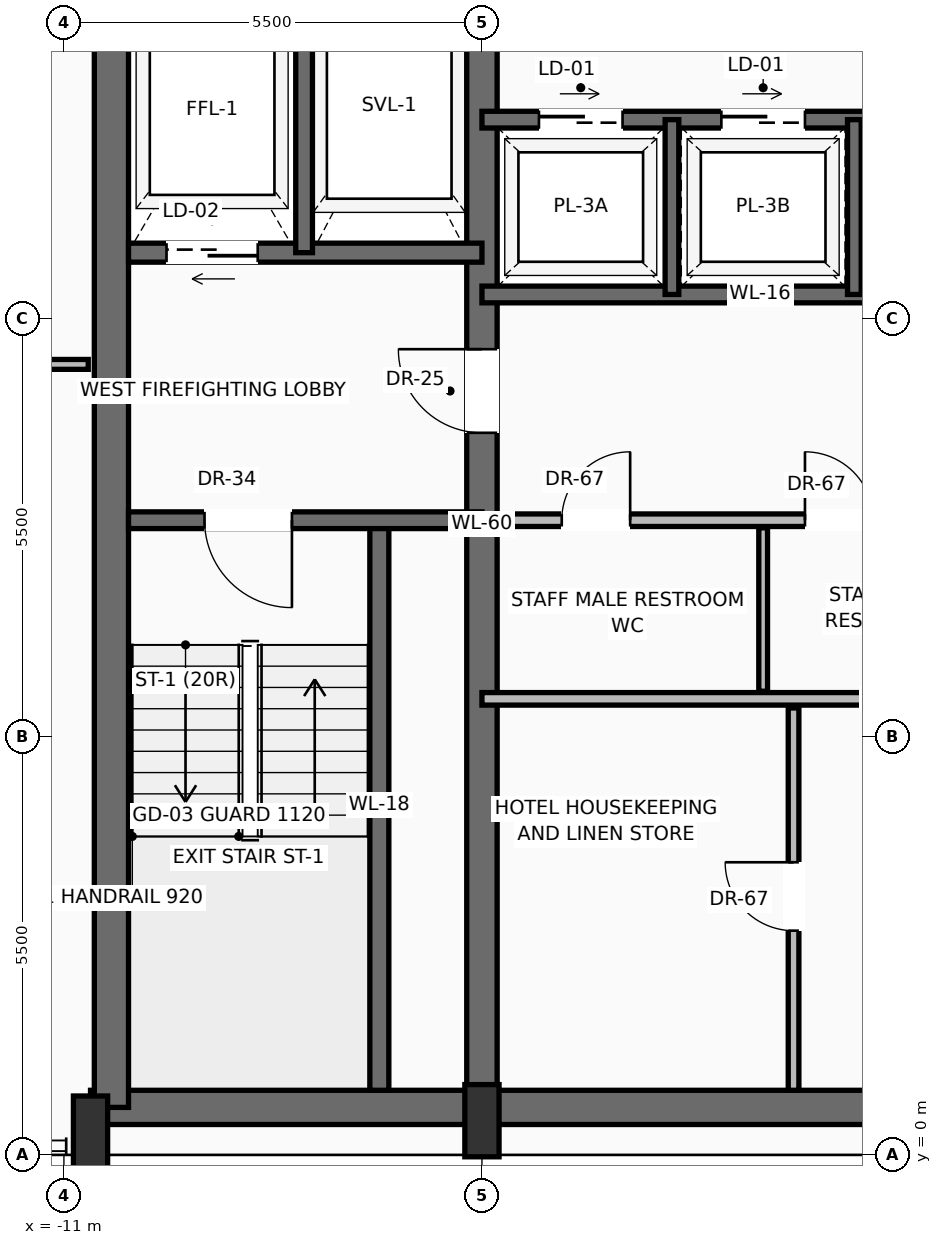
"""IFC4 building model, lengths in metres.
Left out: names, types, materials, properties, quantities, classifications, styles, units other than length and angle.
Written with IfcOpenShell. Run it as: python <this file> out.ifc"""

import sys

from ifc_helpers import new_model, si_unit, direction, frame, frame_2d, origin, origin_2d, place, context, subcontext, project, spatial, rectangle, extrude, source, transform, mapped, element, fill, save


model = new_model("IFC4")
c1 = context("Model", 3, precision=1e-05, world=origin(), true_north=direction((0.0, 1.0)))
c2 = subcontext(c1, "Body", "Model", "MODEL_VIEW")
j1 = project(units=[si_unit("LENGTHUNIT", "METRE"), si_unit("PLANEANGLEUNIT", "RADIAN")], contexts=[c1])
p1 = place(None, origin())
s1 = spatial("IfcSite", under=j1, at=p1, CompositionType="ELEMENT")
p2 = place(p1, origin())
s2 = spatial("IfcBuilding", under=s1, at=p2, CompositionType="ELEMENT")
p3 = place(p2, frame((0.0, 0.0, 269.55)))
s3 = spatial("IfcBuildingStorey", under=s2, at=p3, CompositionType="ELEMENT", Elevation=269.55)
p4 = place(p3, frame((-10.65, 0.625, 0.0), z_axis=(0.0, 0.0, 1.0), x_axis=(1.0, 0.0, 0.0)))
e1 = element("IfcWall", 1, at=p4, inside=s3, PredefinedType="SHEAR", context=c2, shape_type="SweptSolid", body=[
    extrude(rectangle(XDim=21.3, YDim=0.45, at=frame_2d((10.65, 0.0))), origin(), (0.0, 0.0, 1.0), 3.24),
])
p5 = place(p3, frame((-10.375, 0.625, 0.0), z_axis=(0.0, 0.0, 1.0), x_axis=(0.0, 1.0, 0.0)))
e2 = element("IfcWall", 2, at=p5, inside=s3, PredefinedType="SHEAR", context=c2, shape_type="SweptSolid", body=[
    extrude(rectangle(XDim=15.35, YDim=0.45, at=frame_2d((7.675, 0.0))), origin(), (0.0, 0.0, 1.0), 3.24),
])
p6 = place(p3, frame((-5.5, 0.625, 0.0), z_axis=(0.0, 0.0, 1.0), x_axis=(0.0, 1.0, 0.0)))
e3 = element("IfcWall", 3, at=p6, inside=s3, PredefinedType="SHEAR", context=c2, shape_type="SweptSolid", body=[
    extrude(rectangle(XDim=15.35, YDim=0.4, at=frame_2d((7.675, 0.0))), origin(), (0.0, 0.0, 1.0), 3.24),
])
p7 = place(p6, frame((8.875, 0.0, 0.0)))
e4 = element("IfcOpeningElement", 4, at=p7, cuts=e3, PredefinedType="OPENING", context=c2, shape_type="SweptSolid", body=[
    extrude(rectangle(XDim=1.1, YDim=2.2, at=frame_2d((0.55, 1.1))), frame((0.0, 0.21, 0.0), z_axis=(0.0, -1.0, 0.0), x_axis=(1.0, 0.0, 0.0)), (0.0, 0.0, 1.0), 0.42),
])
m1 = source(origin(), c2, "Body", "SweptSolid", [
    extrude(rectangle(XDim=0.45, YDim=0.95, at=origin_2d()), origin(), (0.0, 0.0, 1.0), 3.45),
])
for number, where, z_axis, x_axis in (
    (5, (-10.65, 0.3, 0.0), (0.0, 0.0, 1.0), (1.0, 0.0, 0.0)),
    (6, (-5.5, 0.45, 0.0), (0.0, 0.0, 1.0), (1.0, 0.0, 0.0)),
):
    element("IfcColumn", number, at=place(p3, frame(where, z_axis=z_axis, x_axis=x_axis)), inside=s3, PredefinedType="PILASTER", context=c2, shape_type="MappedRepresentation", body=[
        mapped(m1, transform((0.0, 0.0, 0.0), scale=1.0)),
    ])
p8 = place(p3, frame((-18.621, 14.387, 0.0), z_axis=(0.0, 0.0, 1.0), x_axis=(0.501208020252, 0.865326828681, 0.0)))
e7 = element("IfcWall", 7, at=p8, inside=s3, PredefinedType="SOLIDWALL", context=c2, shape_type="SweptSolid", body=[
    extrude(rectangle(XDim=20.003, YDim=0.28, at=frame_2d((10.001, 0.0))), origin(), (0.0, 0.0, 1.0), 2.82),
])
p9 = place(p8, frame((4.801, 0.0, 0.0)))
e8 = element("IfcOpeningElement", 8, at=p9, cuts=e7, PredefinedType="OPENING", context=c2, shape_type="SweptSolid", body=[
    extrude(rectangle(XDim=1.6, YDim=2.35, at=frame_2d((0.8, 1.175))), frame((0.0, 0.15, 0.0), z_axis=(0.0, -1.0, 0.0), x_axis=(1.0, 0.0, 0.0)), (0.0, 0.0, 1.0), 0.3),
])
p10 = place(p8, frame((13.602, 0.0, 0.9)))
e9 = element("IfcOpeningElement", 9, at=p10, cuts=e7, PredefinedType="OPENING", context=c2, shape_type="SweptSolid", body=[
    extrude(rectangle(XDim=2.0, YDim=1.75, at=frame_2d((1.0, 0.875))), frame((0.0, 0.15, 0.0), z_axis=(0.0, -1.0, 0.0), x_axis=(1.0, 0.0, 0.0)), (0.0, 0.0, 1.0), 0.3),
])
p11 = place(p3, frame((-6.85, 0.85, 0.0), z_axis=(0.0, 0.0, 1.0), x_axis=(0.0, 1.0, 0.0)))
e10 = element("IfcWall", 10, at=p11, inside=s3, PredefinedType="SOLIDWALL", context=c2, shape_type="SweptSolid", body=[
    extrude(rectangle(XDim=7.5, YDim=0.25, at=frame_2d((3.75, 0.0))), origin(), (0.0, 0.0, 1.0), 3.24),
])
p12 = place(p3, frame((-5.5, 8.35, 0.0), z_axis=(0.0, 0.0, 1.0), x_axis=(-1.0, 0.0, 0.0)))
e11 = element("IfcWall", 11, at=p12, inside=s3, PredefinedType="SOLIDWALL", context=c2, shape_type="SweptSolid", body=[
    extrude(rectangle(XDim=4.65, YDim=0.22, at=frame_2d((2.325, 0.0))), origin(), (0.0, 0.0, 1.0), 3.24),
])
p13 = place(p12, frame((2.5, 0.0, 0.0)))
e12 = element("IfcOpeningElement", 12, at=p13, cuts=e11, PredefinedType="OPENING", context=c2, shape_type="SweptSolid", body=[
    extrude(rectangle(XDim=1.15, YDim=2.2, at=frame_2d((0.575, 1.1))), frame((0.0, 0.12, 0.0), z_axis=(0.0, -1.0, 0.0), x_axis=(1.0, 0.0, 0.0)), (0.0, 0.0, 1.0), 0.24),
])
p14 = place(p3, frame((-5.5, 11.87, 0.0), z_axis=(0.0, 0.0, 1.0), x_axis=(-1.0, 0.0, 0.0)))
e13 = element("IfcWall", 13, at=p14, inside=s3, PredefinedType="SOLIDWALL", context=c2, shape_type="SweptSolid", body=[
    extrude(rectangle(XDim=4.65, YDim=0.25, at=frame_2d((2.325, 0.0))), origin(), (0.0, 0.0, 1.0), 3.24),
])
p15 = place(p14, frame((2.95, 0.0, 0.0)))
e14 = element("IfcOpeningElement", 14, at=p15, cuts=e13, PredefinedType="OPENING", context=c2, shape_type="SweptSolid", body=[
    extrude(rectangle(XDim=1.2, YDim=2.25, at=frame_2d((0.6, 1.125))), frame((0.0, 0.135, 0.0), z_axis=(0.0, -1.0, 0.0), x_axis=(1.0, 0.0, 0.0)), (0.0, 0.0, 1.0), 0.27),
])
p16 = place(p3, frame((-7.84, 11.87, 0.0), z_axis=(0.0, 0.0, 1.0), x_axis=(0.0, 1.0, 0.0)))
e15 = element("IfcWall", 15, at=p16, inside=s3, PredefinedType="SOLIDWALL", context=c2, shape_type="SweptSolid", body=[
    extrude(rectangle(XDim=3.88, YDim=0.22, at=frame_2d((1.94, 0.0))), origin(), (0.0, 0.0, 1.0), 3.24),
])
p17 = place(p3, frame((-5.5, 6.0, 0.0), z_axis=(0.0, 0.0, 1.0), x_axis=(1.0, 0.0, 0.0)))
e16 = element("IfcWall", 16, at=p17, inside=s3, PredefinedType="PARTITIONING", context=c2, shape_type="SweptSolid", body=[
    extrude(rectangle(XDim=10.8, YDim=0.165, at=frame_2d((5.4, 0.0))), origin(), (0.0, 0.0, 1.0), 3.232),
])
p18 = place(p17, frame((7.7, 0.0, 0.0)))
e17 = element("IfcOpeningElement", 17, at=p18, cuts=e16, PredefinedType="OPENING", context=c2, shape_type="SweptSolid", body=[
    extrude(rectangle(XDim=0.9, YDim=2.1, at=frame_2d((0.45, 1.05))), frame((0.0, 0.093, 0.0), z_axis=(0.0, -1.0, 0.0), x_axis=(1.0, 0.0, 0.0)), (0.0, 0.0, 1.0), 0.185),
])
p19 = place(p3, frame((-1.4, 0.85, 0.0), z_axis=(0.0, 0.0, 1.0), x_axis=(0.0, 1.0, 0.0)))
e18 = element("IfcWall", 18, at=p19, inside=s3, PredefinedType="PARTITIONING", context=c2, shape_type="SweptSolid", body=[
    extrude(rectangle(XDim=5.03, YDim=0.14, at=frame_2d((2.515, 0.0))), origin(), (0.0, 0.0, 1.0), 3.232),
])
p20 = place(p19, frame((2.1, 0.0, 0.0)))
e19 = element("IfcOpeningElement", 19, at=p20, cuts=e18, PredefinedType="OPENING", context=c2, shape_type="SweptSolid", body=[
    extrude(rectangle(XDim=0.9, YDim=2.1, at=frame_2d((0.45, 1.05))), frame((0.0, 0.08, 0.0), z_axis=(0.0, -1.0, 0.0), x_axis=(1.0, 0.0, 0.0)), (0.0, 0.0, 1.0), 0.16),
])
p21 = place(p3, frame((-5.3, 8.35, 0.0), z_axis=(0.0, 0.0, 1.0), x_axis=(1.0, 0.0, 0.0)))
e20 = element("IfcWall", 20, at=p21, inside=s3, PredefinedType="PARTITIONING", context=c2, shape_type="SweptSolid", body=[
    extrude(rectangle(XDim=7.12, YDim=0.165, at=frame_2d((3.56, 0.0))), origin(), (0.0, 0.0, 1.0), 3.232),
])
p22 = place(p21, frame((0.85, 0.0, 0.0)))
e21 = element("IfcOpeningElement", 21, at=p22, cuts=e20, PredefinedType="OPENING", context=c2, shape_type="SweptSolid", body=[
    extrude(rectangle(XDim=0.9, YDim=2.1, at=frame_2d((0.45, 1.05))), frame((0.0, 0.093, 0.0), z_axis=(0.0, -1.0, 0.0), x_axis=(1.0, 0.0, 0.0)), (0.0, 0.0, 1.0), 0.185),
])
p23 = place(p21, frame((4.05, 0.0, 0.0)))
e22 = element("IfcOpeningElement", 22, at=p23, cuts=e20, PredefinedType="OPENING", context=c2, shape_type="SweptSolid", body=[
    extrude(rectangle(XDim=0.9, YDim=2.1, at=frame_2d((0.45, 1.05))), frame((0.0, 0.093, 0.0), z_axis=(0.0, -1.0, 0.0), x_axis=(1.0, 0.0, 0.0)), (0.0, 0.0, 1.0), 0.185),
])
p24 = place(p3, frame((-1.8, 6.1, 0.0), z_axis=(0.0, 0.0, 1.0), x_axis=(0.0, 1.0, 0.0)))
e23 = element("IfcWall", 23, at=p24, inside=s3, PredefinedType="PARTITIONING", context=c2, shape_type="SweptSolid", body=[
    extrude(rectangle(XDim=2.15, YDim=0.115, at=frame_2d((1.075, 0.0))), origin(), (0.0, 0.0, 1.0), 3.232),
])
p25 = place(p3, frame((-5.5, 11.32, 0.0), z_axis=(0.0, 0.0, 1.0), x_axis=(1.0, 0.0, 0.0)))
e24 = element("IfcWall", 24, at=p25, inside=s3, PredefinedType="SOLIDWALL", context=c2, shape_type="SweptSolid", body=[
    extrude(rectangle(XDim=7.32, YDim=0.22, at=frame_2d((3.66, 0.0))), origin(), (0.0, 0.0, 1.0), 3.24),
])
p26 = place(p3, frame((-5.5, 13.62, 0.0), z_axis=(0.0, 0.0, 1.0), x_axis=(1.0, 0.0, 0.0)))
e25 = element("IfcWall", 25, at=p26, inside=s3, PredefinedType="SOLIDWALL", context=c2, shape_type="SweptSolid", body=[
    extrude(rectangle(XDim=7.32, YDim=0.22, at=frame_2d((3.66, 0.0))), origin(), (0.0, 0.0, 1.0), 3.24),
])
p27 = place(p26, frame((0.75, 0.0, 0.0)))
e26 = element("IfcOpeningElement", 26, at=p27, cuts=e25, PredefinedType="OPENING", context=c2, shape_type="SweptSolid", body=[
    extrude(rectangle(XDim=1.1, YDim=2.2, at=frame_2d((0.55, 1.1))), frame((0.0, 0.12, 0.0), z_axis=(0.0, -1.0, 0.0), x_axis=(1.0, 0.0, 0.0)), (0.0, 0.0, 1.0), 0.24),
])
p28 = place(p26, frame((3.15, 0.0, 0.0)))
e27 = element("IfcOpeningElement", 27, at=p28, cuts=e25, PredefinedType="OPENING", context=c2, shape_type="SweptSolid", body=[
    extrude(rectangle(XDim=1.1, YDim=2.2, at=frame_2d((0.55, 1.1))), frame((0.0, 0.12, 0.0), z_axis=(0.0, -1.0, 0.0), x_axis=(1.0, 0.0, 0.0)), (0.0, 0.0, 1.0), 0.24),
])
p29 = place(p26, frame((5.55, 0.0, 0.0)))
e28 = element("IfcOpeningElement", 28, at=p29, cuts=e25, PredefinedType="OPENING", context=c2, shape_type="SweptSolid", body=[
    extrude(rectangle(XDim=1.1, YDim=2.2, at=frame_2d((0.55, 1.1))), frame((0.0, 0.12, 0.0), z_axis=(0.0, -1.0, 0.0), x_axis=(1.0, 0.0, 0.0)), (0.0, 0.0, 1.0), 0.24),
])
for number, where, z_axis, x_axis in (
    (29, (-3.0, 11.32, 0.0), (0.0, 0.0, 1.0), (0.0, 1.0, 0.0)),
    (30, (-0.6, 11.32, 0.0), (0.0, 0.0, 1.0), (0.0, 1.0, 0.0)),
):
    element("IfcWall", number, at=place(p3, frame(where, z_axis=z_axis, x_axis=x_axis)), inside=s3, PredefinedType="SOLIDWALL", context=c2, shape_type="SweptSolid", body=[
        extrude(rectangle(XDim=2.3, YDim=0.18, at=frame_2d((1.15, 0.0))), origin(), (0.0, 0.0, 1.0), 3.24),
    ])
p30 = place(p3, frame((-21.081, 10.4, 0.0), z_axis=(0.0, 0.0, 1.0), x_axis=(1.0, 0.0, 0.0)))
e31 = element("IfcWall", 31, at=p30, inside=s3, PredefinedType="PARTITIONING", context=c2, shape_type="SweptSolid", body=[
    extrude(rectangle(XDim=10.401, YDim=0.13, at=frame_2d((5.2, 0.0))), origin(), (0.0, 0.0, 1.0), 3.232),
])
p31 = place(p30, frame((4.239, 0.0, 0.0)))
e32 = element("IfcOpeningElement", 32, at=p31, cuts=e31, PredefinedType="OPENING", context=c2, shape_type="SweptSolid", body=[
    extrude(rectangle(XDim=0.95, YDim=2.2, at=frame_2d((0.475, 1.1))), frame((0.0, 0.075, 0.0), z_axis=(0.0, -1.0, 0.0), x_axis=(1.0, 0.0, 0.0)), (0.0, 0.0, 1.0), 0.15),
])
m2 = source(origin(), c2, "Body", "SweptSolid", [
    extrude(rectangle(XDim=1.15, YDim=2.2, at=frame_2d((0.575, 1.1))), frame((0.0, 0.025, 0.0), z_axis=(0.0, -1.0, 0.0), x_axis=(1.0, 0.0, 0.0)), (0.0, 0.0, 1.0), 0.05),
])
p32 = place(p13, origin())
e33 = element("IfcDoor", 33, at=p32, inside=s3, OperationType="SINGLE_SWING_LEFT", PredefinedType="DOOR", context=c2, shape_type="MappedRepresentation", body=[
    mapped(m2, transform((0.0, 0.0, 0.0), scale=1.0)),
])
fill(e12, e33)
m3 = source(origin(), c2, "Body", "SweptSolid", [
    extrude(rectangle(XDim=1.1, YDim=2.2, at=frame_2d((0.55, 1.1))), frame((0.0, 0.025, 0.0), z_axis=(0.0, -1.0, 0.0), x_axis=(1.0, 0.0, 0.0)), (0.0, 0.0, 1.0), 0.05),
])
p33 = place(p7, origin())
e34 = element("IfcDoor", 34, at=p33, inside=s3, OperationType="SINGLE_SWING_RIGHT", PredefinedType="DOOR", context=c2, shape_type="MappedRepresentation", body=[
    mapped(m3, transform((0.0, 0.0, 0.0), scale=1.0)),
])
fill(e4, e34)
m4 = source(origin(), c2, "Body", "SweptSolid", [
    extrude(rectangle(XDim=1.2, YDim=2.25, at=frame_2d((0.6, 1.125))), frame((0.0, 0.025, 0.0), z_axis=(0.0, -1.0, 0.0), x_axis=(1.0, 0.0, 0.0)), (0.0, 0.0, 1.0), 0.05),
])
p34 = place(p15, origin())
e35 = element("IfcDoor", 35, at=p34, inside=s3, OperationType="SLIDING_TO_LEFT", PredefinedType="DOOR", context=c2, shape_type="MappedRepresentation", body=[
    mapped(m4, transform((0.0, 0.0, 0.0), scale=1.0)),
])
fill(e14, e35)
m5 = source(origin(), c2, "Body", "SweptSolid", [
    extrude(rectangle(XDim=0.9, YDim=2.1, at=frame_2d((0.45, 1.05))), frame((0.0, 0.025, 0.0), z_axis=(0.0, -1.0, 0.0), x_axis=(1.0, 0.0, 0.0)), (0.0, 0.0, 1.0), 0.05),
])
p35 = place(p20, origin())
e36 = element("IfcDoor", 36, at=p35, inside=s3, OperationType="SINGLE_SWING_RIGHT", PredefinedType="DOOR", context=c2, shape_type="MappedRepresentation", body=[
    mapped(m5, transform((0.0, 0.0, 0.0), scale=1.0)),
])
fill(e19, e36)
p36 = place(p22, origin())
e37 = element("IfcDoor", 37, at=p36, inside=s3, OperationType="SINGLE_SWING_RIGHT", PredefinedType="DOOR", context=c2, shape_type="MappedRepresentation", body=[
    mapped(m5, transform((0.0, 0.0, 0.0), scale=1.0)),
])
fill(e21, e37)
p37 = place(p23, origin())
e38 = element("IfcDoor", 38, at=p37, inside=s3, OperationType="SINGLE_SWING_LEFT", PredefinedType="DOOR", context=c2, shape_type="MappedRepresentation", body=[
    mapped(m5, transform((0.0, 0.0, 0.0), scale=1.0)),
])
fill(e22, e38)
m6 = source(origin(), c2, "Body", "SweptSolid", [
    extrude(rectangle(XDim=1.1, YDim=2.2, at=frame_2d((0.55, 1.1))), frame((0.0, 0.025, 0.0), z_axis=(0.0, -1.0, 0.0), x_axis=(1.0, 0.0, 0.0)), (0.0, 0.0, 1.0), 0.05),
])
p38 = place(p27, origin())
e39 = element("IfcDoor", 39, at=p38, inside=s3, OperationType="SLIDING_TO_RIGHT", PredefinedType="DOOR", context=c2, shape_type="MappedRepresentation", body=[
    mapped(m6, transform((0.0, 0.0, 0.0), scale=1.0)),
])
fill(e26, e39)
p39 = place(p28, origin())
e40 = element("IfcDoor", 40, at=p39, inside=s3, OperationType="SLIDING_TO_RIGHT", PredefinedType="DOOR", context=c2, shape_type="MappedRepresentation", body=[
    mapped(m6, transform((0.0, 0.0, 0.0), scale=1.0)),
])
fill(e27, e40)
save(model, sys.argv[1])
